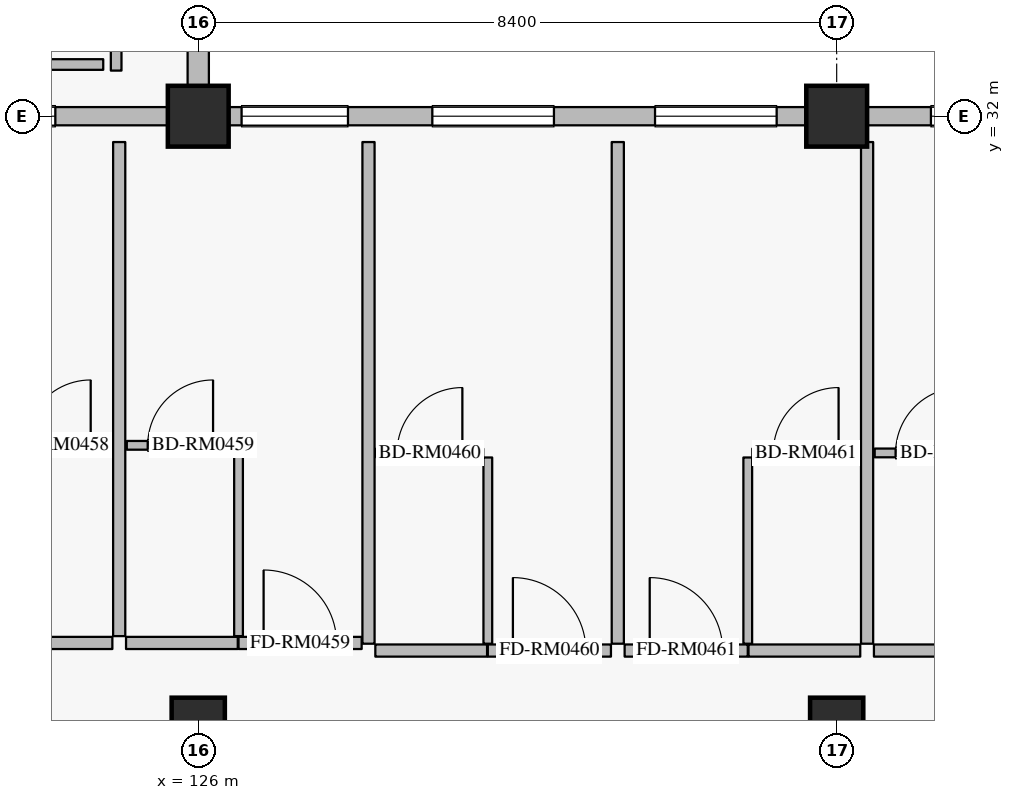
"""IFC4 building model, lengths in metres.
Left out: names, types, materials, properties, quantities, classifications, styles, units other than length and angle.
Written with IfcOpenShell. Run it as: python <this file> out.ifc"""

import sys

from ifc_helpers import new_model, si_unit, direction, frame, frame_2d, origin, origin_2d, place, context, subcontext, project, spatial, rectangle, extrude, element, fill, save


model = new_model("IFC4")
c1 = context("Model", 3, precision=1e-05, world=origin(), true_north=direction((0.0, 1.0)))
c2 = subcontext(c1, "Body", "Model", "MODEL_VIEW")
j1 = project(units=[si_unit("LENGTHUNIT", "METRE"), si_unit("PLANEANGLEUNIT", "RADIAN")], contexts=[c1])
p1 = place(None, origin())
s1 = spatial("IfcSite", under=j1, at=p1, CompositionType="ELEMENT")
p2 = place(p1, origin())
s2 = spatial("IfcBuilding", under=s1, at=p2, CompositionType="ELEMENT")
p3 = place(p2, frame((0.0, 0.0, 16.2)))
s3 = spatial("IfcBuildingStorey", under=s2, at=p3, CompositionType="ELEMENT", Elevation=16.2)
for number, where, z_axis, x_axis in (
    (1, (126.0, 32.0, 0.0), (0.0, 0.0, 1.0), (1.0, 0.0, 0.0)),
    (2, (134.4, 32.0, 0.0), (0.0, 0.0, 1.0), (1.0, 0.0, 0.0)),
):
    element("IfcColumn", number, at=place(p3, frame(where, z_axis=z_axis, x_axis=x_axis)), inside=s3, PredefinedType="COLUMN", context=c2, shape_type="SweptSolid", body=[
        extrude(rectangle(XDim=0.8, YDim=0.8, at=origin_2d()), origin(), (0.0, 0.0, 1.0), 4.8),
    ])
for number, where, z_axis, x_axis in (
    (3, (126.0, 24.0, 0.0), (0.0, 0.0, 1.0), (1.0, 0.0, 0.0)),
    (4, (134.4, 24.0, 0.0), (0.0, 0.0, 1.0), (1.0, 0.0, 0.0)),
):
    element("IfcColumn", number, at=place(p3, frame(where, z_axis=z_axis, x_axis=x_axis)), inside=s3, PredefinedType="COLUMN", context=c2, shape_type="SweptSolid", body=[
        extrude(rectangle(XDim=0.7, YDim=0.7, at=origin_2d()), origin(), (0.0, 0.0, 1.0), 4.8),
    ])
p4 = place(p3, frame((126.0, 39.7, 0.0), z_axis=(0.0, 0.0, 1.0), x_axis=(0.0, -1.0, 0.0)))
e5 = element("IfcWall", 5, at=p4, inside=s3, PredefinedType="SOLIDWALL", context=c2, shape_type="SweptSolid", body=[
    extrude(rectangle(XDim=7.3, YDim=0.28, at=frame_2d((3.65, 0.0))), origin(), (0.0, 0.0, 1.0), 4.5),
])
p5 = place(p4, frame((2.3, 0.0, 1.0)))
e6 = element("IfcOpeningElement", 6, at=p5, cuts=e5, PredefinedType="OPENING", context=c2, shape_type="SweptSolid", body=[
    extrude(rectangle(XDim=2.7, YDim=1.2, at=frame_2d((1.35, 0.6))), frame((0.0, 0.15, 0.0), z_axis=(0.0, -1.0, 0.0), x_axis=(1.0, 0.0, 0.0)), (0.0, 0.0, 1.0), 0.3),
])
p6 = place(p3, frame((118.0, 32.0, 0.0), z_axis=(0.0, 0.0, 1.0), x_axis=(1.0, 0.0, 0.0)))
e7 = element("IfcWall", 7, at=p6, inside=s3, PredefinedType="SOLIDWALL", context=c2, shape_type="SweptSolid", body=[
    extrude(rectangle(XDim=7.6, YDim=0.24, at=frame_2d((3.8, 0.0))), origin(), (0.0, 0.0, 1.0), 4.09),
])
p7 = place(p6, frame((1.24, 0.0, 0.8)))
e8 = element("IfcOpeningElement", 8, at=p7, cuts=e7, PredefinedType="OPENING", context=c2, shape_type="SweptSolid", body=[
    extrude(rectangle(XDim=1.6, YDim=1.6, at=frame_2d((0.8, 0.8))), frame((0.0, 0.13, 0.0), z_axis=(0.0, -1.0, 0.0), x_axis=(1.0, 0.0, 0.0)), (0.0, 0.0, 1.0), 0.26),
])
p8 = place(p6, frame((4.52, 0.0, 0.8)))
e9 = element("IfcOpeningElement", 9, at=p8, cuts=e7, PredefinedType="OPENING", context=c2, shape_type="SweptSolid", body=[
    extrude(rectangle(XDim=1.6, YDim=1.6, at=frame_2d((0.8, 0.8))), frame((0.0, 0.13, 0.0), z_axis=(0.0, -1.0, 0.0), x_axis=(1.0, 0.0, 0.0)), (0.0, 0.0, 1.0), 0.26),
])
p9 = place(p3, frame((126.4, 32.0, 0.0), z_axis=(0.0, 0.0, 1.0), x_axis=(1.0, 0.0, 0.0)))
e10 = element("IfcWall", 10, at=p9, inside=s3, PredefinedType="SOLIDWALL", context=c2, shape_type="SweptSolid", body=[
    extrude(rectangle(XDim=7.6, YDim=0.24, at=frame_2d((3.8, 0.0))), origin(), (0.0, 0.0, 1.0), 4.09),
])
p10 = place(p9, frame((0.17, 0.0, 0.8)))
e11 = element("IfcOpeningElement", 11, at=p10, cuts=e10, PredefinedType="OPENING", context=c2, shape_type="SweptSolid", body=[
    extrude(rectangle(XDim=1.4, YDim=1.6, at=frame_2d((0.7, 0.8))), frame((0.0, 0.13, 0.0), z_axis=(0.0, -1.0, 0.0), x_axis=(1.0, 0.0, 0.0)), (0.0, 0.0, 1.0), 0.26),
])
p11 = place(p9, frame((2.68, 0.0, 0.8)))
e12 = element("IfcOpeningElement", 12, at=p11, cuts=e10, PredefinedType="OPENING", context=c2, shape_type="SweptSolid", body=[
    extrude(rectangle(XDim=1.6, YDim=1.6, at=frame_2d((0.8, 0.8))), frame((0.0, 0.13, 0.0), z_axis=(0.0, -1.0, 0.0), x_axis=(1.0, 0.0, 0.0)), (0.0, 0.0, 1.0), 0.26),
])
p12 = place(p9, frame((5.61, 0.0, 0.8)))
e13 = element("IfcOpeningElement", 13, at=p12, cuts=e10, PredefinedType="OPENING", context=c2, shape_type="SweptSolid", body=[
    extrude(rectangle(XDim=1.6, YDim=1.6, at=frame_2d((0.8, 0.8))), frame((0.0, 0.13, 0.0), z_axis=(0.0, -1.0, 0.0), x_axis=(1.0, 0.0, 0.0)), (0.0, 0.0, 1.0), 0.26),
])
p13 = place(p3, frame((134.8, 32.0, 0.0), z_axis=(0.0, 0.0, 1.0), x_axis=(1.0, 0.0, 0.0)))
e14 = element("IfcWall", 14, at=p13, inside=s3, PredefinedType="SOLIDWALL", context=c2, shape_type="SweptSolid", body=[
    extrude(rectangle(XDim=7.6, YDim=0.24, at=frame_2d((3.8, 0.0))), origin(), (0.0, 0.0, 1.0), 4.13),
])
p14 = place(p13, frame((0.84, 0.0, 0.8)))
e15 = element("IfcOpeningElement", 15, at=p14, cuts=e14, PredefinedType="OPENING", context=c2, shape_type="SweptSolid", body=[
    extrude(rectangle(XDim=1.6, YDim=1.6, at=frame_2d((0.8, 0.8))), frame((0.0, 0.13, 0.0), z_axis=(0.0, -1.0, 0.0), x_axis=(1.0, 0.0, 0.0)), (0.0, 0.0, 1.0), 0.26),
])
p15 = place(p13, frame((4.12, 0.0, 0.8)))
e16 = element("IfcOpeningElement", 16, at=p15, cuts=e14, PredefinedType="OPENING", context=c2, shape_type="SweptSolid", body=[
    extrude(rectangle(XDim=1.6, YDim=1.6, at=frame_2d((0.8, 0.8))), frame((0.0, 0.13, 0.0), z_axis=(0.0, -1.0, 0.0), x_axis=(1.0, 0.0, 0.0)), (0.0, 0.0, 1.0), 0.26),
])
p16 = place(p3, frame((123.4, 25.07, 0.0), z_axis=(0.0, 0.0, 1.0), x_axis=(1.0, 0.0, 0.0)))
e17 = element("IfcWall", 17, at=p16, inside=s3, PredefinedType="PARTITIONING", context=c2, shape_type="SweptSolid", body=[
    extrude(rectangle(XDim=1.47, YDim=0.16, at=frame_2d((0.735, 0.0))), origin(), (0.0, 0.0, 1.0), 4.535),
])
p17 = place(p3, frame((123.45, 27.67, 0.0), z_axis=(0.0, 0.0, 1.0), x_axis=(1.0, 0.0, 0.0)))
e18 = element("IfcWall", 18, at=p17, inside=s3, PredefinedType="PARTITIONING", context=c2, shape_type="SweptSolid", body=[
    extrude(rectangle(XDim=1.41, YDim=0.115, at=frame_2d((0.705, 0.0))), origin(), (0.0, 0.0, 1.0), 4.535),
])
p18 = place(p17, frame((0.275, 0.0, 0.0)))
e19 = element("IfcOpeningElement", 19, at=p18, cuts=e18, PredefinedType="OPENING", context=c2, shape_type="SweptSolid", body=[
    extrude(rectangle(XDim=0.86, YDim=2.12, at=frame_2d((0.43, 1.06))), frame((0.0, 0.067, 0.0), z_axis=(0.0, -1.0, 0.0), x_axis=(1.0, 0.0, 0.0)), (0.0, 0.0, 1.0), 0.135),
])
p19 = place(p3, frame((125.05, 25.07, 0.0), z_axis=(0.0, 0.0, 1.0), x_axis=(1.0, 0.0, 0.0)))
e20 = element("IfcWall", 20, at=p19, inside=s3, PredefinedType="PARTITIONING", context=c2, shape_type="SweptSolid", body=[
    extrude(rectangle(XDim=1.47, YDim=0.16, at=frame_2d((0.735, 0.0))), origin(), (0.0, 0.0, 1.0), 4.535),
])
p20 = place(p3, frame((126.53, 25.07, 0.0), z_axis=(0.0, 0.0, 1.0), x_axis=(1.0, 0.0, 0.0)))
e21 = element("IfcWall", 21, at=p20, inside=s3, PredefinedType="PARTITIONING", context=c2, shape_type="SweptSolid", body=[
    extrude(rectangle(XDim=1.62, YDim=0.16, at=frame_2d((0.81, 0.0))), origin(), (0.0, 0.0, 1.0), 4.535),
])
p21 = place(p20, frame((0.33, 0.0, 0.0)))
e22 = element("IfcOpeningElement", 22, at=p21, cuts=e21, PredefinedType="OPENING", context=c2, shape_type="SweptSolid", body=[
    extrude(rectangle(XDim=0.96, YDim=2.2, at=frame_2d((0.48, 1.1))), frame((0.0, 0.09, 0.0), z_axis=(0.0, -1.0, 0.0), x_axis=(1.0, 0.0, 0.0)), (0.0, 0.0, 1.0), 0.18),
])
p22 = place(p3, frame((126.53, 25.16, 0.0), z_axis=(0.0, 0.0, 1.0), x_axis=(0.0, 1.0, 0.0)))
e23 = element("IfcWall", 23, at=p22, inside=s3, PredefinedType="PARTITIONING", context=c2, shape_type="SweptSolid", body=[
    extrude(rectangle(XDim=2.45, YDim=0.115, at=frame_2d((1.225, 0.0))), origin(), (0.0, 0.0, 1.0), 4.535),
])
p23 = place(p3, frame((125.06, 27.67, 0.0), z_axis=(0.0, 0.0, 1.0), x_axis=(1.0, 0.0, 0.0)))
e24 = element("IfcWall", 24, at=p23, inside=s3, PredefinedType="PARTITIONING", context=c2, shape_type="SweptSolid", body=[
    extrude(rectangle(XDim=1.41, YDim=0.115, at=frame_2d((0.705, 0.0))), origin(), (0.0, 0.0, 1.0), 4.535),
])
p24 = place(p23, frame((0.275, 0.0, 0.0)))
e25 = element("IfcOpeningElement", 25, at=p24, cuts=e24, PredefinedType="OPENING", context=c2, shape_type="SweptSolid", body=[
    extrude(rectangle(XDim=0.86, YDim=2.12, at=frame_2d((0.43, 1.06))), frame((0.0, 0.067, 0.0), z_axis=(0.0, -1.0, 0.0), x_axis=(1.0, 0.0, 0.0)), (0.0, 0.0, 1.0), 0.135),
])
p25 = place(p3, frame((124.96, 25.16, 0.0), z_axis=(0.0, 0.0, 1.0), x_axis=(0.0, 1.0, 0.0)))
e26 = element("IfcWall", 26, at=p25, inside=s3, PredefinedType="PARTITIONING", context=c2, shape_type="SweptSolid", body=[
    extrude(rectangle(XDim=6.5, YDim=0.16, at=frame_2d((3.25, 0.0))), origin(), (0.0, 0.0, 1.0), 4.535),
])
p26 = place(p3, frame((128.33, 24.97, 0.0), z_axis=(0.0, 0.0, 1.0), x_axis=(1.0, 0.0, 0.0)))
e27 = element("IfcWall", 27, at=p26, inside=s3, PredefinedType="PARTITIONING", context=c2, shape_type="SweptSolid", body=[
    extrude(rectangle(XDim=1.47, YDim=0.16, at=frame_2d((0.735, 0.0))), origin(), (0.0, 0.0, 1.0), 4.535),
])
p27 = place(p3, frame((129.81, 24.97, 0.0), z_axis=(0.0, 0.0, 1.0), x_axis=(1.0, 0.0, 0.0)))
e28 = element("IfcWall", 28, at=p27, inside=s3, PredefinedType="PARTITIONING", context=c2, shape_type="SweptSolid", body=[
    extrude(rectangle(XDim=1.62, YDim=0.16, at=frame_2d((0.81, 0.0))), origin(), (0.0, 0.0, 1.0), 4.535),
])
p28 = place(p27, frame((0.33, 0.0, 0.0)))
e29 = element("IfcOpeningElement", 29, at=p28, cuts=e28, PredefinedType="OPENING", context=c2, shape_type="SweptSolid", body=[
    extrude(rectangle(XDim=0.96, YDim=2.2, at=frame_2d((0.48, 1.1))), frame((0.0, 0.09, 0.0), z_axis=(0.0, -1.0, 0.0), x_axis=(1.0, 0.0, 0.0)), (0.0, 0.0, 1.0), 0.18),
])
p29 = place(p3, frame((129.81, 25.06, 0.0), z_axis=(0.0, 0.0, 1.0), x_axis=(0.0, 1.0, 0.0)))
e30 = element("IfcWall", 30, at=p29, inside=s3, PredefinedType="PARTITIONING", context=c2, shape_type="SweptSolid", body=[
    extrude(rectangle(XDim=2.45, YDim=0.115, at=frame_2d((1.225, 0.0))), origin(), (0.0, 0.0, 1.0), 4.535),
])
p30 = place(p3, frame((128.34, 27.57, 0.0), z_axis=(0.0, 0.0, 1.0), x_axis=(1.0, 0.0, 0.0)))
e31 = element("IfcWall", 31, at=p30, inside=s3, PredefinedType="PARTITIONING", context=c2, shape_type="SweptSolid", body=[
    extrude(rectangle(XDim=1.41, YDim=0.115, at=frame_2d((0.705, 0.0))), origin(), (0.0, 0.0, 1.0), 4.535),
])
p31 = place(p30, frame((0.275, 0.0, 0.0)))
e32 = element("IfcOpeningElement", 32, at=p31, cuts=e31, PredefinedType="OPENING", context=c2, shape_type="SweptSolid", body=[
    extrude(rectangle(XDim=0.86, YDim=2.12, at=frame_2d((0.43, 1.06))), frame((0.0, 0.067, 0.0), z_axis=(0.0, -1.0, 0.0), x_axis=(1.0, 0.0, 0.0)), (0.0, 0.0, 1.0), 0.135),
])
p32 = place(p3, frame((128.24, 25.06, 0.0), z_axis=(0.0, 0.0, 1.0), x_axis=(0.0, 1.0, 0.0)))
e33 = element("IfcWall", 33, at=p32, inside=s3, PredefinedType="PARTITIONING", context=c2, shape_type="SweptSolid", body=[
    extrude(rectangle(XDim=6.6, YDim=0.16, at=frame_2d((3.3, 0.0))), origin(), (0.0, 0.0, 1.0), 4.535),
])
p33 = place(p3, frame((131.61, 24.97, 0.0), z_axis=(0.0, 0.0, 1.0), x_axis=(1.0, 0.0, 0.0)))
e34 = element("IfcWall", 34, at=p33, inside=s3, PredefinedType="PARTITIONING", context=c2, shape_type="SweptSolid", body=[
    extrude(rectangle(XDim=1.62, YDim=0.16, at=frame_2d((0.81, 0.0))), origin(), (0.0, 0.0, 1.0), 4.535),
])
p34 = place(p33, frame((0.33, 0.0, 0.0)))
e35 = element("IfcOpeningElement", 35, at=p34, cuts=e34, PredefinedType="OPENING", context=c2, shape_type="SweptSolid", body=[
    extrude(rectangle(XDim=0.96, YDim=2.2, at=frame_2d((0.48, 1.1))), frame((0.0, 0.09, 0.0), z_axis=(0.0, -1.0, 0.0), x_axis=(1.0, 0.0, 0.0)), (0.0, 0.0, 1.0), 0.18),
])
p35 = place(p3, frame((133.24, 24.97, 0.0), z_axis=(0.0, 0.0, 1.0), x_axis=(1.0, 0.0, 0.0)))
e36 = element("IfcWall", 36, at=p35, inside=s3, PredefinedType="PARTITIONING", context=c2, shape_type="SweptSolid", body=[
    extrude(rectangle(XDim=1.47, YDim=0.16, at=frame_2d((0.735, 0.0))), origin(), (0.0, 0.0, 1.0), 4.535),
])
p36 = place(p3, frame((133.23, 25.06, 0.0), z_axis=(0.0, 0.0, 1.0), x_axis=(0.0, 1.0, 0.0)))
e37 = element("IfcWall", 37, at=p36, inside=s3, PredefinedType="PARTITIONING", context=c2, shape_type="SweptSolid", body=[
    extrude(rectangle(XDim=2.45, YDim=0.115, at=frame_2d((1.225, 0.0))), origin(), (0.0, 0.0, 1.0), 4.535),
])
p37 = place(p3, frame((133.29, 27.57, 0.0), z_axis=(0.0, 0.0, 1.0), x_axis=(1.0, 0.0, 0.0)))
e38 = element("IfcWall", 38, at=p37, inside=s3, PredefinedType="PARTITIONING", context=c2, shape_type="SweptSolid", body=[
    extrude(rectangle(XDim=1.41, YDim=0.115, at=frame_2d((0.705, 0.0))), origin(), (0.0, 0.0, 1.0), 4.535),
])
p38 = place(p37, frame((0.275, 0.0, 0.0)))
e39 = element("IfcOpeningElement", 39, at=p38, cuts=e38, PredefinedType="OPENING", context=c2, shape_type="SweptSolid", body=[
    extrude(rectangle(XDim=0.86, YDim=2.12, at=frame_2d((0.43, 1.06))), frame((0.0, 0.067, 0.0), z_axis=(0.0, -1.0, 0.0), x_axis=(1.0, 0.0, 0.0)), (0.0, 0.0, 1.0), 0.135),
])
p39 = place(p3, frame((131.52, 25.06, 0.0), z_axis=(0.0, 0.0, 1.0), x_axis=(0.0, 1.0, 0.0)))
e40 = element("IfcWall", 40, at=p39, inside=s3, PredefinedType="PARTITIONING", context=c2, shape_type="SweptSolid", body=[
    extrude(rectangle(XDim=6.6, YDim=0.16, at=frame_2d((3.3, 0.0))), origin(), (0.0, 0.0, 1.0), 4.535),
])
p40 = place(p3, frame((134.89, 24.97, 0.0), z_axis=(0.0, 0.0, 1.0), x_axis=(1.0, 0.0, 0.0)))
e41 = element("IfcWall", 41, at=p40, inside=s3, PredefinedType="PARTITIONING", context=c2, shape_type="SweptSolid", body=[
    extrude(rectangle(XDim=1.47, YDim=0.16, at=frame_2d((0.735, 0.0))), origin(), (0.0, 0.0, 1.0), 4.535),
])
p41 = place(p3, frame((134.9, 27.57, 0.0), z_axis=(0.0, 0.0, 1.0), x_axis=(1.0, 0.0, 0.0)))
e42 = element("IfcWall", 42, at=p41, inside=s3, PredefinedType="PARTITIONING", context=c2, shape_type="SweptSolid", body=[
    extrude(rectangle(XDim=1.41, YDim=0.115, at=frame_2d((0.705, 0.0))), origin(), (0.0, 0.0, 1.0), 4.535),
])
p42 = place(p41, frame((0.275, 0.0, 0.0)))
e43 = element("IfcOpeningElement", 43, at=p42, cuts=e42, PredefinedType="OPENING", context=c2, shape_type="SweptSolid", body=[
    extrude(rectangle(XDim=0.86, YDim=2.12, at=frame_2d((0.43, 1.06))), frame((0.0, 0.067, 0.0), z_axis=(0.0, -1.0, 0.0), x_axis=(1.0, 0.0, 0.0)), (0.0, 0.0, 1.0), 0.135),
])
p43 = place(p3, frame((134.8, 25.06, 0.0), z_axis=(0.0, 0.0, 1.0), x_axis=(0.0, 1.0, 0.0)))
e44 = element("IfcWall", 44, at=p43, inside=s3, PredefinedType="PARTITIONING", context=c2, shape_type="SweptSolid", body=[
    extrude(rectangle(XDim=6.6, YDim=0.16, at=frame_2d((3.3, 0.0))), origin(), (0.0, 0.0, 1.0), 4.535),
])
p44 = place(p3, frame((112.34, 32.68, 0.0), z_axis=(0.0, 0.0, 1.0), x_axis=(1.0, 0.0, 0.0)))
e45 = element("IfcWall", 45, at=p44, inside=s3, PredefinedType="PARTITIONING", context=c2, shape_type="SweptSolid", body=[
    extrude(rectangle(XDim=12.41, YDim=0.14, at=frame_2d((6.205, 0.0))), origin(), (0.0, 0.0, 1.0), 4.535),
])
p45 = place(p44, frame((2.6, 0.0, 0.0)))
e46 = element("IfcOpeningElement", 46, at=p45, cuts=e45, PredefinedType="OPENING", context=c2, shape_type="SweptSolid", body=[
    extrude(rectangle(XDim=1.9, YDim=2.4, at=frame_2d((0.95, 1.2))), frame((0.0, 0.08, 0.0), z_axis=(0.0, -1.0, 0.0), x_axis=(1.0, 0.0, 0.0)), (0.0, 0.0, 1.0), 0.16),
])
p46 = place(p3, frame((124.92, 32.6, 0.0), z_axis=(0.0, 0.0, 1.0), x_axis=(0.0, 1.0, 0.0)))
e47 = element("IfcWall", 47, at=p46, inside=s3, PredefinedType="PARTITIONING", context=c2, shape_type="SweptSolid", body=[
    extrude(rectangle(XDim=11.6, YDim=0.14, at=frame_2d((5.8, 0.0))), origin(), (0.0, 0.0, 1.0), 4.535),
])
p47 = place(p8, origin())
e48 = element("IfcWindow", 48, at=p47, inside=s3, PartitioningType="SINGLE_PANEL", PredefinedType="WINDOW", context=c2, shape_type="SweptSolid", body=[
    extrude(rectangle(XDim=1.6, YDim=1.6, at=frame_2d((0.8, 0.8))), frame((0.0, 0.03, 0.0), z_axis=(0.0, -1.0, 0.0), x_axis=(1.0, 0.0, 0.0)), (0.0, 0.0, 1.0), 0.06),
])
fill(e9, e48)
p48 = place(p10, origin())
e49 = element("IfcWindow", 49, at=p48, inside=s3, PartitioningType="SINGLE_PANEL", PredefinedType="WINDOW", context=c2, shape_type="SweptSolid", body=[
    extrude(rectangle(XDim=1.4, YDim=1.6, at=frame_2d((0.7, 0.8))), frame((0.0, 0.03, 0.0), z_axis=(0.0, -1.0, 0.0), x_axis=(1.0, 0.0, 0.0)), (0.0, 0.0, 1.0), 0.06),
])
fill(e11, e49)
p49 = place(p11, origin())
e50 = element("IfcWindow", 50, at=p49, inside=s3, PartitioningType="SINGLE_PANEL", PredefinedType="WINDOW", context=c2, shape_type="SweptSolid", body=[
    extrude(rectangle(XDim=1.6, YDim=1.6, at=frame_2d((0.8, 0.8))), frame((0.0, 0.03, 0.0), z_axis=(0.0, -1.0, 0.0), x_axis=(1.0, 0.0, 0.0)), (0.0, 0.0, 1.0), 0.06),
])
fill(e12, e50)
p50 = place(p12, origin())
e51 = element("IfcWindow", 51, at=p50, inside=s3, PartitioningType="SINGLE_PANEL", PredefinedType="WINDOW", context=c2, shape_type="SweptSolid", body=[
    extrude(rectangle(XDim=1.6, YDim=1.6, at=frame_2d((0.8, 0.8))), frame((0.0, 0.03, 0.0), z_axis=(0.0, -1.0, 0.0), x_axis=(1.0, 0.0, 0.0)), (0.0, 0.0, 1.0), 0.06),
])
fill(e13, e51)
p51 = place(p14, origin())
e52 = element("IfcWindow", 52, at=p51, inside=s3, PartitioningType="SINGLE_PANEL", PredefinedType="WINDOW", context=c2, shape_type="SweptSolid", body=[
    extrude(rectangle(XDim=1.6, YDim=1.6, at=frame_2d((0.8, 0.8))), frame((0.0, 0.03, 0.0), z_axis=(0.0, -1.0, 0.0), x_axis=(1.0, 0.0, 0.0)), (0.0, 0.0, 1.0), 0.06),
])
fill(e15, e52)
p52 = place(p18, origin())
e53 = element("IfcDoor", 53, at=p52, inside=s3, OperationType="SINGLE_SWING_RIGHT", PredefinedType="DOOR", context=c2, shape_type="SweptSolid", body=[
    extrude(rectangle(XDim=0.86, YDim=2.12, at=frame_2d((0.43, 1.06))), frame((0.0, 0.025, 0.0), z_axis=(0.0, -1.0, 0.0), x_axis=(1.0, 0.0, 0.0)), (0.0, 0.0, 1.0), 0.05),
])
fill(e19, e53)
p53 = place(p21, origin())
e54 = element("IfcDoor", 54, at=p53, inside=s3, OperationType="SINGLE_SWING_LEFT", PredefinedType="DOOR", context=c2, shape_type="SweptSolid", body=[
    extrude(rectangle(XDim=0.96, YDim=2.2, at=frame_2d((0.48, 1.1))), frame((0.0, 0.025, 0.0), z_axis=(0.0, -1.0, 0.0), x_axis=(1.0, 0.0, 0.0)), (0.0, 0.0, 1.0), 0.05),
])
fill(e22, e54)
p54 = place(p24, origin())
e55 = element("IfcDoor", 55, at=p54, inside=s3, OperationType="SINGLE_SWING_RIGHT", PredefinedType="DOOR", context=c2, shape_type="SweptSolid", body=[
    extrude(rectangle(XDim=0.86, YDim=2.12, at=frame_2d((0.43, 1.06))), frame((0.0, 0.025, 0.0), z_axis=(0.0, -1.0, 0.0), x_axis=(1.0, 0.0, 0.0)), (0.0, 0.0, 1.0), 0.05),
])
fill(e25, e55)
p55 = place(p28, origin())
e56 = element("IfcDoor", 56, at=p55, inside=s3, OperationType="SINGLE_SWING_LEFT", PredefinedType="DOOR", context=c2, shape_type="SweptSolid", body=[
    extrude(rectangle(XDim=0.96, YDim=2.2, at=frame_2d((0.48, 1.1))), frame((0.0, 0.025, 0.0), z_axis=(0.0, -1.0, 0.0), x_axis=(1.0, 0.0, 0.0)), (0.0, 0.0, 1.0), 0.05),
])
fill(e29, e56)
p56 = place(p31, origin())
e57 = element("IfcDoor", 57, at=p56, inside=s3, OperationType="SINGLE_SWING_RIGHT", PredefinedType="DOOR", context=c2, shape_type="SweptSolid", body=[
    extrude(rectangle(XDim=0.86, YDim=2.12, at=frame_2d((0.43, 1.06))), frame((0.0, 0.025, 0.0), z_axis=(0.0, -1.0, 0.0), x_axis=(1.0, 0.0, 0.0)), (0.0, 0.0, 1.0), 0.05),
])
fill(e32, e57)
p57 = place(p34, origin())
e58 = element("IfcDoor", 58, at=p57, inside=s3, OperationType="SINGLE_SWING_LEFT", PredefinedType="DOOR", context=c2, shape_type="SweptSolid", body=[
    extrude(rectangle(XDim=0.96, YDim=2.2, at=frame_2d((0.48, 1.1))), frame((0.0, 0.025, 0.0), z_axis=(0.0, -1.0, 0.0), x_axis=(1.0, 0.0, 0.0)), (0.0, 0.0, 1.0), 0.05),
])
fill(e35, e58)
p58 = place(p38, origin())
e59 = element("IfcDoor", 59, at=p58, inside=s3, OperationType="SINGLE_SWING_RIGHT", PredefinedType="DOOR", context=c2, shape_type="SweptSolid", body=[
    extrude(rectangle(XDim=0.86, YDim=2.12, at=frame_2d((0.43, 1.06))), frame((0.0, 0.025, 0.0), z_axis=(0.0, -1.0, 0.0), x_axis=(1.0, 0.0, 0.0)), (0.0, 0.0, 1.0), 0.05),
])
fill(e39, e59)
p59 = place(p42, origin())
e60 = element("IfcDoor", 60, at=p59, inside=s3, OperationType="SINGLE_SWING_RIGHT", PredefinedType="DOOR", context=c2, shape_type="SweptSolid", body=[
    extrude(rectangle(XDim=0.86, YDim=2.12, at=frame_2d((0.43, 1.06))), frame((0.0, 0.025, 0.0), z_axis=(0.0, -1.0, 0.0), x_axis=(1.0, 0.0, 0.0)), (0.0, 0.0, 1.0), 0.05),
])
fill(e43, e60)
save(model, sys.argv[1])
